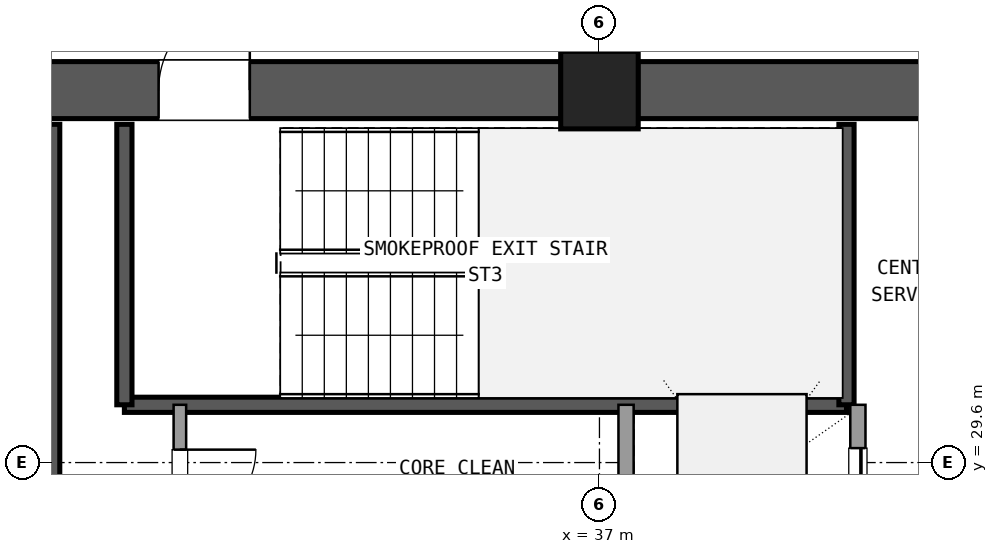
"""IFC4 building model, lengths in metres.
Left out: names, types, materials, properties, quantities, classifications, styles, units other than length and angle.
Written with IfcOpenShell. Run it as: python <this file> out.ifc"""

import sys

from ifc_helpers import new_model, si_unit, direction, frame, frame_2d, origin, origin_2d, place, context, subcontext, project, spatial, rectangle, extrude, element, fill, save


model = new_model("IFC4")
c1 = context("Model", 3, precision=1e-05, world=origin(), true_north=direction((0.0, 1.0)))
c2 = subcontext(c1, "Body", "Model", "MODEL_VIEW")
j1 = project(units=[si_unit("LENGTHUNIT", "METRE"), si_unit("PLANEANGLEUNIT", "RADIAN")], contexts=[c1])
p1 = place(None, origin())
s1 = spatial("IfcSite", under=j1, at=p1, CompositionType="ELEMENT")
p2 = place(p1, origin())
s2 = spatial("IfcBuilding", under=s1, at=p2, CompositionType="ELEMENT")
p3 = place(p2, frame((0.0, 0.0, 138.42)))
s3 = spatial("IfcBuildingStorey", under=s2, at=p3, CompositionType="ELEMENT", Elevation=138.42)
p4 = place(p3, frame((37.0, 34.5, 0.0), z_axis=(0.0, 0.0, 1.0), x_axis=(1.0, 0.0, 0.0)))
e1 = element("IfcColumn", 1, at=p4, inside=s3, PredefinedType="COLUMN", context=c2, shape_type="SweptSolid", body=[
    extrude(rectangle(XDim=1.02, YDim=1.02, at=origin_2d()), origin(), (0.0, 0.0, 1.0), 3.6),
])
p5 = place(p3, frame((47.695, 34.5, 0.0), z_axis=(0.0, 0.0, 1.0), x_axis=(-1.0, 0.0, 0.0)))
e2 = element("IfcWall", 2, at=p5, inside=s3, PredefinedType="SHEAR", context=c2, shape_type="SweptSolid", body=[
    extrude(rectangle(XDim=10.19, YDim=0.75, at=frame_2d((5.095, 0.0))), origin(), (0.0, 0.0, 1.0), 3.32),
])
p6 = place(p5, frame((4.595, 0.0, 0.0)))
e3 = element("IfcOpeningElement", 3, at=p6, cuts=e2, PredefinedType="OPENING", context=c2, shape_type="SweptSolid", body=[
    extrude(rectangle(XDim=1.6, YDim=2.2, at=frame_2d((0.8, 1.1))), frame((0.0, 0.385, 0.0), z_axis=(0.0, -1.0, 0.0), x_axis=(1.0, 0.0, 0.0)), (0.0, 0.0, 1.0), 0.77),
])
p7 = place(p3, frame((36.495, 34.5, 0.0), z_axis=(0.0, 0.0, 1.0), x_axis=(-1.0, 0.0, 0.0)))
e4 = element("IfcWall", 4, at=p7, inside=s3, PredefinedType="SHEAR", context=c2, shape_type="SweptSolid", body=[
    extrude(rectangle(XDim=10.19, YDim=0.75, at=frame_2d((5.095, 0.0))), origin(), (0.0, 0.0, 1.0), 3.32),
])
p8 = place(p7, frame((4.095, 0.0, 0.0)))
e5 = element("IfcOpeningElement", 5, at=p8, cuts=e4, PredefinedType="OPENING", context=c2, shape_type="SweptSolid", body=[
    extrude(rectangle(XDim=1.2, YDim=2.15, at=frame_2d((0.6, 1.075))), frame((0.0, 0.385, 0.0), z_axis=(0.0, -1.0, 0.0), x_axis=(1.0, 0.0, 0.0)), (0.0, 0.0, 1.0), 0.77),
])
p9 = place(p3, frame((29.8, 24.65, 0.0), z_axis=(0.0, 0.0, 1.0), x_axis=(0.0, 1.0, 0.0)))
e6 = element("IfcWall", 6, at=p9, inside=s3, PredefinedType="SHEAR", context=c2, shape_type="SweptSolid", body=[
    extrude(rectangle(XDim=9.4, YDim=0.2, at=frame_2d((4.7, 0.0))), origin(), (0.0, 0.0, 1.0), 3.32),
])
p10 = place(p3, frame((30.75, 30.36, 0.0), z_axis=(0.0, 0.0, 1.0), x_axis=(1.0, 0.0, 0.0)))
e7 = element("IfcWall", 7, at=p10, inside=s3, PredefinedType="SHEAR", context=c2, shape_type="SweptSolid", body=[
    extrude(rectangle(XDim=9.5, YDim=0.2, at=frame_2d((4.75, 0.0))), origin(), (0.0, 0.0, 1.0), 3.32),
])
for number, where, z_axis, x_axis in (
    (8, (30.75, 30.36, 0.0), (0.0, 0.0, 1.0), (0.0, 1.0, 0.0)),
    (9, (40.25, 30.36, 0.0), (0.0, 0.0, 1.0), (0.0, 1.0, 0.0)),
):
    element("IfcWall", number, at=place(p3, frame(where, z_axis=z_axis, x_axis=x_axis)), inside=s3, PredefinedType="SHEAR", context=c2, shape_type="SweptSolid", body=[
        extrude(rectangle(XDim=3.69, YDim=0.2, at=frame_2d((1.845, 0.0))), origin(), (0.0, 0.0, 1.0), 3.32),
    ])
p11 = place(p3, frame((37.35, 23.54, 0.0), z_axis=(0.0, 0.0, 1.0), x_axis=(0.0, 1.0, 0.0)))
e10 = element("IfcWall", 10, at=p11, inside=s3, PredefinedType="SOLIDWALL", context=c2, shape_type="SweptSolid", body=[
    extrude(rectangle(XDim=6.82, YDim=0.2, at=frame_2d((3.41, 0.0))), origin(), (0.0, 0.0, 1.0), 2.61),
])
p12 = place(p3, frame((40.4, 23.54, 0.0), z_axis=(0.0, 0.0, 1.0), x_axis=(0.0, 1.0, 0.0)))
e11 = element("IfcWall", 11, at=p12, inside=s3, PredefinedType="SOLIDWALL", context=c2, shape_type="SweptSolid", body=[
    extrude(rectangle(XDim=6.82, YDim=0.2, at=frame_2d((3.41, 0.0))), origin(), (0.0, 0.0, 1.0), 2.61),
])
p13 = place(p12, frame((0.35, 0.0, 0.0)))
e12 = element("IfcOpeningElement", 12, at=p13, cuts=e11, PredefinedType="OPENING", context=c2, shape_type="SweptSolid", body=[
    extrude(rectangle(XDim=1.4, YDim=2.2, at=frame_2d((0.7, 1.1))), frame((0.0, 0.11, 0.0), z_axis=(0.0, -1.0, 0.0), x_axis=(1.0, 0.0, 0.0)), (0.0, 0.0, 1.0), 0.22),
])
p14 = place(p12, frame((2.65, 0.0, 0.0)))
e13 = element("IfcOpeningElement", 13, at=p14, cuts=e11, PredefinedType="OPENING", context=c2, shape_type="SweptSolid", body=[
    extrude(rectangle(XDim=1.4, YDim=2.2, at=frame_2d((0.7, 1.1))), frame((0.0, 0.11, 0.0), z_axis=(0.0, -1.0, 0.0), x_axis=(1.0, 0.0, 0.0)), (0.0, 0.0, 1.0), 0.22),
])
p15 = place(p12, frame((4.85, 0.0, 0.0)))
e14 = element("IfcOpeningElement", 14, at=p15, cuts=e11, PredefinedType="OPENING", context=c2, shape_type="SweptSolid", body=[
    extrude(rectangle(XDim=1.4, YDim=2.2, at=frame_2d((0.7, 1.1))), frame((0.0, 0.11, 0.0), z_axis=(0.0, -1.0, 0.0), x_axis=(1.0, 0.0, 0.0)), (0.0, 0.0, 1.0), 0.22),
])
p16 = place(p3, frame((31.48, 26.32, 0.0), z_axis=(0.0, 0.0, 1.0), x_axis=(0.0, 1.0, 0.0)))
e15 = element("IfcWall", 15, at=p16, inside=s3, PredefinedType="PLUMBINGWALL", context=c2, shape_type="SweptSolid", body=[
    extrude(rectangle(XDim=4.04, YDim=0.165, at=frame_2d((2.02, 0.0))), origin(), (0.0, 0.0, 1.0), 2.61),
])
p17 = place(p16, frame((0.5, 0.0, 0.0)))
e16 = element("IfcOpeningElement", 16, at=p17, cuts=e15, PredefinedType="OPENING", context=c2, shape_type="SweptSolid", body=[
    extrude(rectangle(XDim=0.95, YDim=2.1, at=frame_2d((0.475, 1.05))), frame((0.0, 0.093, 0.0), z_axis=(0.0, -1.0, 0.0), x_axis=(1.0, 0.0, 0.0)), (0.0, 0.0, 1.0), 0.185),
])
p18 = place(p16, frame((2.45, 0.0, 0.0)))
e17 = element("IfcOpeningElement", 17, at=p18, cuts=e15, PredefinedType="OPENING", context=c2, shape_type="SweptSolid", body=[
    extrude(rectangle(XDim=1.0, YDim=2.15, at=frame_2d((0.5, 1.075))), frame((0.0, 0.093, 0.0), z_axis=(0.0, -1.0, 0.0), x_axis=(1.0, 0.0, 0.0)), (0.0, 0.0, 1.0), 0.185),
])
p19 = place(p3, frame((37.0, 34.95, 0.0), z_axis=(0.0, 0.0, 1.0), x_axis=(0.0, 1.0, 0.0)))
e18 = element("IfcWall", 18, at=p19, inside=s3, PredefinedType="PARTITIONING", context=c2, shape_type="SweptSolid", body=[
    extrude(rectangle(XDim=3.21, YDim=0.18, at=frame_2d((1.605, 0.0))), origin(), (0.0, 0.0, 1.0), 2.61),
])
p20 = place(p19, frame((0.605, 0.0, 0.0)))
e19 = element("IfcOpeningElement", 19, at=p20, cuts=e18, PredefinedType="OPENING", context=c2, shape_type="SweptSolid", body=[
    extrude(rectangle(XDim=2.0, YDim=2.2, at=frame_2d((1.0, 1.1))), frame((0.0, 0.1, 0.0), z_axis=(0.0, -1.0, 0.0), x_axis=(1.0, 0.0, 0.0)), (0.0, 0.0, 1.0), 0.2),
])
p21 = place(p8, frame((1.2, 0.0, 0.0), z_axis=(0.0, 0.0, 1.0), x_axis=(-1.0, 0.0, 0.0)))
e20 = element("IfcDoor", 20, at=p21, inside=s3, OperationType="SINGLE_SWING_LEFT", PredefinedType="DOOR", context=c2, shape_type="SweptSolid", body=[
    extrude(rectangle(XDim=1.2, YDim=2.15, at=frame_2d((0.6, 1.075))), frame((0.0, 0.025, 0.0), z_axis=(0.0, -1.0, 0.0), x_axis=(1.0, 0.0, 0.0)), (0.0, 0.0, 1.0), 0.05),
])
fill(e5, e20)
p22 = place(p15, origin())
e21 = element("IfcDoor", 21, at=p22, inside=s3, OperationType="SLIDING_TO_RIGHT", PredefinedType="DOOR", context=c2, shape_type="SweptSolid", body=[
    extrude(rectangle(XDim=1.4, YDim=2.2, at=frame_2d((0.7, 1.1))), frame((0.0, 0.025, 0.0), z_axis=(0.0, -1.0, 0.0), x_axis=(1.0, 0.0, 0.0)), (0.0, 0.0, 1.0), 0.05),
])
fill(e14, e21)
p23 = place(p18, frame((1.0, 0.0, 0.0), z_axis=(0.0, 0.0, 1.0), x_axis=(-1.0, 0.0, 0.0)))
e22 = element("IfcDoor", 22, at=p23, inside=s3, OperationType="SINGLE_SWING_RIGHT", PredefinedType="DOOR", context=c2, shape_type="SweptSolid", body=[
    extrude(rectangle(XDim=1.0, YDim=2.15, at=frame_2d((0.5, 1.075))), frame((0.0, 0.025, 0.0), z_axis=(0.0, -1.0, 0.0), x_axis=(1.0, 0.0, 0.0)), (0.0, 0.0, 1.0), 0.05),
])
fill(e17, e22)
save(model, sys.argv[1])
